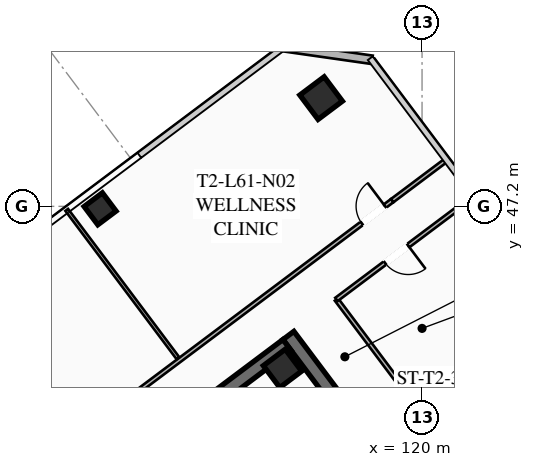
"""IFC4 building model, lengths in metres.
Left out: names, types, materials, properties, quantities, classifications, styles, units other than length and angle.
Written with IfcOpenShell. Run it as: python <this file> out.ifc"""

import sys

from ifc_helpers import new_model, si_unit, direction, frame, frame_2d, origin, origin_2d, place, context, subcontext, project, spatial, rectangle, hollow_rectangle, extrude, element, fill, save


model = new_model("IFC4")
c1 = context("Model", 3, precision=1e-05, world=origin(), true_north=direction((0.0, 1.0)))
c2 = subcontext(c1, "Body", "Model", "MODEL_VIEW")
j1 = project(units=[si_unit("LENGTHUNIT", "METRE"), si_unit("PLANEANGLEUNIT", "RADIAN")], contexts=[c1])
p1 = place(None, origin())
s1 = spatial("IfcSite", under=j1, at=p1, CompositionType="ELEMENT")
p2 = place(p1, origin())
s2 = spatial("IfcBuilding", under=s1, at=p2, CompositionType="ELEMENT")
p3 = place(p2, frame((0.0, 0.0, 225.5)))
s3 = spatial("IfcBuildingStorey", under=s2, at=p3, CompositionType="ELEMENT", Elevation=225.5)
p4 = place(p3, frame((115.604, 42.953, 0.0), z_axis=(0.0, 0.0, 1.0), x_axis=(0.600005007985, -0.799996243986, 0.0)))
e1 = element("IfcWall", 1, at=p4, inside=s3, PredefinedType="SHEAR", context=c2, shape_type="SweptSolid", body=[
    extrude(rectangle(XDim=15.6, YDim=0.45, at=frame_2d((7.8, 0.0))), origin(), (0.0, 0.0, 1.0), 3.55),
])
p5 = place(p3, frame((103.351, 33.482, 0.0), z_axis=(0.0, 0.0, 1.0), x_axis=(0.8, 0.6, 0.0)))
e2 = element("IfcWall", 2, at=p5, inside=s3, PredefinedType="SHEAR", context=c2, shape_type="SweptSolid", body=[
    extrude(rectangle(XDim=15.26, YDim=0.45, at=frame_2d((7.63, 0.0))), origin(), (0.0, 0.0, 1.0), 3.55),
])
p6 = place(p5, frame((4.68, 0.0, 0.0)))
e3 = element("IfcOpeningElement", 3, at=p6, cuts=e2, PredefinedType="OPENING", context=c2, shape_type="SweptSolid", body=[
    extrude(rectangle(XDim=1.25, YDim=2.25, at=frame_2d((0.625, 1.125))), frame((0.0, 0.235, 0.0), z_axis=(0.0, -1.0, 0.0), x_axis=(1.0, 0.0, 0.0)), (0.0, 0.0, 1.0), 0.47),
])
p7 = place(p5, frame((9.73, 0.0, 0.0)))
e4 = element("IfcOpeningElement", 4, at=p7, cuts=e2, PredefinedType="OPENING", context=c2, shape_type="SweptSolid", body=[
    extrude(rectangle(XDim=1.25, YDim=2.25, at=frame_2d((0.625, 1.125))), frame((0.0, 0.235, 0.0), z_axis=(0.0, -1.0, 0.0), x_axis=(1.0, 0.0, 0.0)), (0.0, 0.0, 1.0), 0.47),
])
p8 = place(p3, frame((115.41, 41.87, 0.0), z_axis=(0.0, 0.0, 1.0), x_axis=(0.799999996291, 0.600000004945, 0.0)))
e5 = element("IfcColumn", 5, at=p8, inside=s3, PredefinedType="COLUMN", context=c2, shape_type="SweptSolid", body=[
    extrude(hollow_rectangle(XDim=0.9, YDim=0.9, WallThickness=0.04, at=origin_2d()), origin(), (0.0, 0.0, 1.0), 3.37),
])
p9 = place(p3, frame((116.68, 50.76, 0.0), z_axis=(0.0, 0.0, 1.0), x_axis=(0.799999996291, 0.600000004945, 0.0)))
e6 = element("IfcColumn", 6, at=p9, inside=s3, PredefinedType="COLUMN", context=c2, shape_type="SweptSolid", body=[
    extrude(hollow_rectangle(XDim=1.0, YDim=1.0, WallThickness=0.04, at=origin_2d()), origin(), (0.0, 0.0, 1.0), 3.37),
])
p10 = place(p3, frame((109.41, 47.12, 0.0), z_axis=(0.0, 0.0, 1.0), x_axis=(0.799999996291, 0.600000004945, 0.0)))
e7 = element("IfcColumn", 7, at=p10, inside=s3, PredefinedType="COLUMN", context=c2, shape_type="SweptSolid", body=[
    extrude(hollow_rectangle(XDim=0.75, YDim=0.75, WallThickness=0.032, at=origin_2d()), origin(), (0.0, 0.0, 1.0), 3.37),
])
p11 = place(p3, frame((115.42, 52.44, 0.0), z_axis=(0.0, 0.0, 1.0), x_axis=(0.989954425158, -0.14138683146, 0.0)))
e8 = element("IfcWall", 8, at=p11, inside=s3, PredefinedType="SOLIDWALL", context=c2, shape_type="SweptSolid", body=[
    extrude(rectangle(XDim=2.97, YDim=0.28, at=frame_2d((1.485, 0.0))), origin(), (0.0, 0.0, 1.0), 3.37),
])
p12 = place(p3, frame((121.204, 41.528, 0.0), z_axis=(0.0, 0.0, 1.0), x_axis=(-0.800017232136, -0.599977023131, 0.0)))
e9 = element("IfcWall", 9, at=p12, inside=s3, PredefinedType="SHEAR", context=c2, shape_type="SweptSolid", body=[
    extrude(rectangle(XDim=3.4, YDim=0.2, at=frame_2d((1.7, 0.0))), origin(), (0.0, 0.0, 1.0), 3.37),
])
p13 = place(p12, frame((1.975, 0.0, 0.0)))
e10 = element("IfcOpeningElement", 10, at=p13, cuts=e9, PredefinedType="OPENING", context=c2, shape_type="SweptSolid", body=[
    extrude(rectangle(XDim=1.15, YDim=2.2, at=frame_2d((0.575, 1.1))), frame((0.0, 0.11, 0.0), z_axis=(0.0, -1.0, 0.0), x_axis=(1.0, 0.0, 0.0)), (0.0, 0.0, 1.0), 0.22),
])
p14 = place(p3, frame((119.824, 40.618, 0.0), z_axis=(0.0, 0.0, 1.0), x_axis=(-0.599982243973, 0.800013316712, 0.0)))
e11 = element("IfcWall", 11, at=p14, inside=s3, PredefinedType="PARTITIONING", context=c2, shape_type="SweptSolid", body=[
    extrude(rectangle(XDim=4.4, YDim=0.135, at=frame_2d((2.2, 0.0))), origin(), (0.0, 0.0, 1.0), 2.723),
])
p15 = place(p3, frame((100.756, 33.692, 0.0), z_axis=(0.0, 0.0, 1.0), x_axis=(0.799998716732, 0.60000171102, 0.0)))
e12 = element("IfcWall", 12, at=p15, inside=s3, PredefinedType="PARTITIONING", context=c2, shape_type="SweptSolid", body=[
    extrude(rectangle(XDim=22.83, YDim=0.135, at=frame_2d((11.415, 0.0))), origin(), (0.0, 0.0, 1.0), 2.723),
])
p16 = place(p15, frame((9.193, 0.0, 0.0)))
e13 = element("IfcOpeningElement", 13, at=p16, cuts=e12, PredefinedType="OPENING", context=c2, shape_type="SweptSolid", body=[
    extrude(rectangle(XDim=0.95, YDim=2.05, at=frame_2d((0.475, 1.025))), frame((0.0, 0.077, 0.0), z_axis=(0.0, -1.0, 0.0), x_axis=(1.0, 0.0, 0.0)), (0.0, 0.0, 1.0), 0.155),
])
p17 = place(p15, frame((21.58, 0.0, 0.0)))
e14 = element("IfcOpeningElement", 14, at=p17, cuts=e12, PredefinedType="OPENING", context=c2, shape_type="SweptSolid", body=[
    extrude(rectangle(XDim=0.95, YDim=2.05, at=frame_2d((0.475, 1.025))), frame((0.0, 0.077, 0.0), z_axis=(0.0, -1.0, 0.0), x_axis=(1.0, 0.0, 0.0)), (0.0, 0.0, 1.0), 0.155),
])
p18 = place(p3, frame((119.02, 47.39, 0.0), z_axis=(0.0, 0.0, 1.0), x_axis=(0.799960585956, 0.600052548463, 0.0)))
e15 = element("IfcWall", 15, at=p18, inside=s3, PredefinedType="PARTITIONING", context=c2, shape_type="SweptSolid", body=[
    extrude(rectangle(XDim=2.23, YDim=0.135, at=frame_2d((1.115, 0.0))), origin(), (0.0, 0.0, 1.0), 2.723),
])
p19 = place(p3, frame((111.972, 42.204, 0.0), z_axis=(0.0, 0.0, 1.0), x_axis=(-0.6, 0.8, 0.0)))
e16 = element("IfcWall", 16, at=p19, inside=s3, PredefinedType="PARTITIONING", context=c2, shape_type="SweptSolid", body=[
    extrude(rectangle(XDim=6.1, YDim=0.11, at=frame_2d((3.05, 0.0))), origin(), (0.0, 0.0, 1.0), 2.723),
])
p20 = place(p3, frame((121.704, 47.528, 0.0), z_axis=(0.0, 0.0, 1.0), x_axis=(-0.799989629485, -0.600013827105, 0.0)))
e17 = element("IfcWall", 17, at=p20, inside=s3, PredefinedType="PARTITIONING", context=c2, shape_type="SweptSolid", body=[
    extrude(rectangle(XDim=5.65, YDim=0.135, at=frame_2d((2.825, 0.0))), origin(), (0.0, 0.0, 1.0), 2.723),
])
p21 = place(p20, frame((2.7, 0.0, 0.0)))
e18 = element("IfcOpeningElement", 18, at=p21, cuts=e17, PredefinedType="OPENING", context=c2, shape_type="SweptSolid", body=[
    extrude(rectangle(XDim=0.95, YDim=2.05, at=frame_2d((0.475, 1.025))), frame((0.0, 0.077, 0.0), z_axis=(0.0, -1.0, 0.0), x_axis=(1.0, 0.0, 0.0)), (0.0, 0.0, 1.0), 0.155),
])
p22 = place(p17, origin())
e19 = element("IfcDoor", 19, at=p22, inside=s3, OperationType="SINGLE_SWING_RIGHT", PredefinedType="DOOR", context=c2, shape_type="SweptSolid", body=[
    extrude(rectangle(XDim=0.95, YDim=2.05, at=frame_2d((0.475, 1.025))), frame((0.0, 0.025, 0.0), z_axis=(0.0, -1.0, 0.0), x_axis=(1.0, 0.0, 0.0)), (0.0, 0.0, 1.0), 0.05),
])
fill(e14, e19)
p23 = place(p21, origin())
e20 = element("IfcDoor", 20, at=p23, inside=s3, OperationType="SINGLE_SWING_LEFT", PredefinedType="DOOR", context=c2, shape_type="SweptSolid", body=[
    extrude(rectangle(XDim=0.95, YDim=2.05, at=frame_2d((0.475, 1.025))), frame((0.0, 0.025, 0.0), z_axis=(0.0, -1.0, 0.0), x_axis=(1.0, 0.0, 0.0)), (0.0, 0.0, 1.0), 0.05),
])
fill(e18, e20)
save(model, sys.argv[1])
